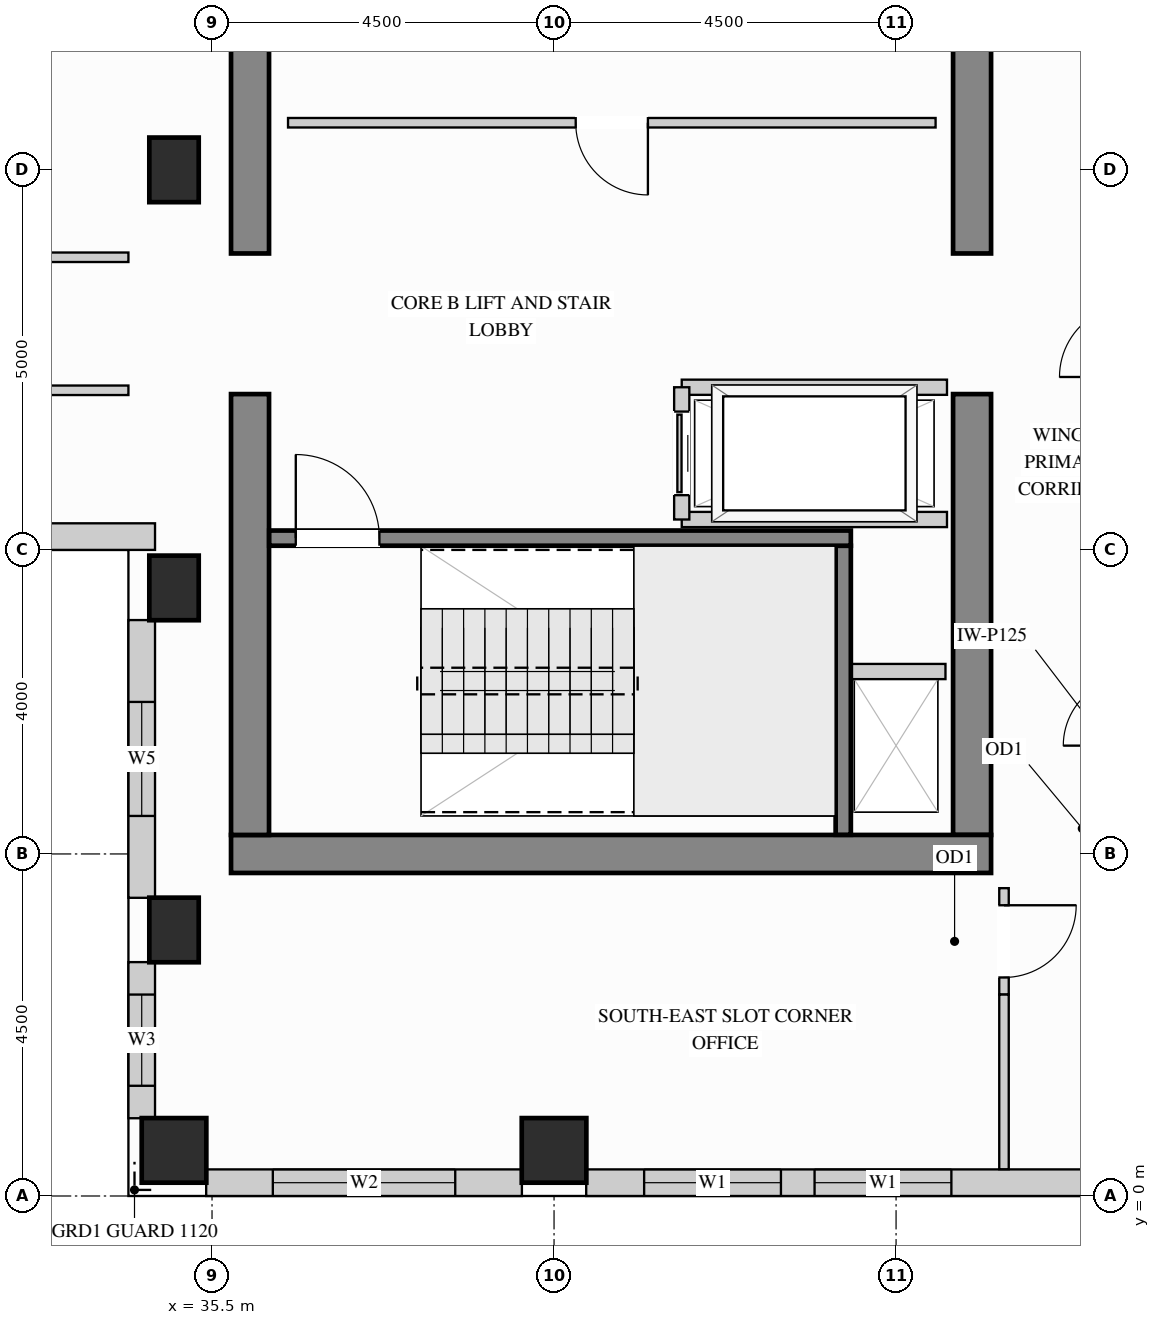
"""IFC4 building model, lengths in metres.
Left out: names, types, materials, properties, quantities, classifications, styles, units other than length and angle.
Written with IfcOpenShell. Run it as: python <this file> out.ifc"""

import sys

from ifc_helpers import new_model, si_unit, direction, frame, frame_2d, origin, origin_2d, place, context, subcontext, project, spatial, rectangle, extrude, source, transform, mapped, element, fill, save


model = new_model("IFC4")
c1 = context("Model", 3, precision=1e-05, world=origin(), true_north=direction((0.0, 1.0)))
c2 = subcontext(c1, "Body", "Model", "MODEL_VIEW")
j1 = project(units=[si_unit("LENGTHUNIT", "METRE"), si_unit("PLANEANGLEUNIT", "RADIAN")], contexts=[c1])
p1 = place(None, origin())
s1 = spatial("IfcSite", under=j1, at=p1, CompositionType="ELEMENT")
p2 = place(p1, origin())
s2 = spatial("IfcBuilding", under=s1, at=p2, CompositionType="ELEMENT")
p3 = place(p2, frame((0.0, 0.0, 234.0)))
s3 = spatial("IfcBuildingStorey", under=s2, at=p3, CompositionType="ELEMENT", Elevation=234.0)
m1 = source(origin(), c2, "Body", "SweptSolid", [
    extrude(rectangle(XDim=0.65, YDim=0.85, at=origin_2d()), origin(), (0.0, 0.0, 1.0), 3.4),
])
for number, where, z_axis, x_axis in (
    (1, (35.0, 13.5, 0.0), (0.0, 0.0, 1.0), (1.0, 0.0, 0.0)),
    (2, (35.0, 3.5, 0.0), (0.0, 0.0, 1.0), (1.0, 0.0, 0.0)),
    (3, (35.0, 8.0, 0.0), (0.0, 0.0, 1.0), (1.0, 0.0, 0.0)),
):
    element("IfcColumn", number, at=place(p3, frame(where, z_axis=z_axis, x_axis=x_axis)), inside=s3, PredefinedType="COLUMN", context=c2, shape_type="MappedRepresentation", body=[
        mapped(m1, transform((0.0, 0.0, 0.0), x_axis=(1.0, 0.0, 0.0), y_axis=(0.0, 1.0, 0.0), z_axis=(0.0, 0.0, 1.0))),
    ])
m2 = source(origin(), c2, "Body", "SweptSolid", [
    extrude(rectangle(XDim=0.85, YDim=0.85, at=origin_2d()), origin(), (0.0, 0.0, 1.0), 3.4),
])
for number, where, z_axis, x_axis in (
    (4, (35.0, 0.6, 0.0), (0.0, 0.0, 1.0), (1.0, 0.0, 0.0)),
    (5, (40.0, 0.6, 0.0), (0.0, 0.0, 1.0), (1.0, 0.0, 0.0)),
):
    element("IfcColumn", number, at=place(p3, frame(where, z_axis=z_axis, x_axis=x_axis)), inside=s3, PredefinedType="COLUMN", context=c2, shape_type="MappedRepresentation", body=[
        mapped(m2, transform((0.0, 0.0, 0.0), x_axis=(1.0, 0.0, 0.0), y_axis=(0.0, 1.0, 0.0), z_axis=(0.0, 0.0, 1.0))),
    ])
m3 = source(origin(), c2, "Body", "SweptSolid", [
    extrude(rectangle(XDim=5.8, YDim=0.5, at=frame_2d((2.9, 0.0))), origin(), (0.0, 0.0, 1.0), 3.4),
])
p4 = place(p3, frame((45.5, 4.75, 0.0), z_axis=(0.0, 0.0, 1.0), x_axis=(0.0, 1.0, 0.0)))
e6 = element("IfcWall", 6, at=p4, inside=s3, PredefinedType="SHEAR", context=c2, shape_type="MappedRepresentation", body=[
    mapped(m3, transform((0.0, 0.0, 0.0), x_axis=(1.0, 0.0, 0.0), y_axis=(0.0, 1.0, 0.0), z_axis=(0.0, 0.0, 1.0))),
])
m4 = source(origin(), c2, "Body", "SweptSolid", [
    extrude(rectangle(XDim=3.85, YDim=0.5, at=frame_2d((1.925, 0.0))), origin(), (0.0, 0.0, 1.0), 3.4),
])
p5 = place(p3, frame((45.5, 12.4, 0.0), z_axis=(0.0, 0.0, 1.0), x_axis=(0.0, 1.0, 0.0)))
e7 = element("IfcWall", 7, at=p5, inside=s3, PredefinedType="SHEAR", context=c2, shape_type="MappedRepresentation", body=[
    mapped(m4, transform((0.0, 0.0, 0.0), x_axis=(1.0, 0.0, 0.0), y_axis=(0.0, 1.0, 0.0), z_axis=(0.0, 0.0, 1.0))),
])
m5 = source(origin(), c2, "Body", "SweptSolid", [
    extrude(rectangle(XDim=10.0, YDim=0.5, at=frame_2d((5.0, 0.0))), origin(), (0.0, 0.0, 1.0), 3.4),
])
p6 = place(p3, frame((35.75, 4.5, 0.0), z_axis=(0.0, 0.0, 1.0), x_axis=(1.0, 0.0, 0.0)))
e8 = element("IfcWall", 8, at=p6, inside=s3, PredefinedType="SHEAR", context=c2, shape_type="MappedRepresentation", body=[
    mapped(m5, transform((0.0, 0.0, 0.0), x_axis=(1.0, 0.0, 0.0), y_axis=(0.0, 1.0, 0.0), z_axis=(0.0, 0.0, 1.0))),
])
p7 = place(p3, frame((36.0, 4.75, 0.0), z_axis=(0.0, 0.0, 1.0), x_axis=(0.0, 1.0, 0.0)))
e9 = element("IfcWall", 9, at=p7, inside=s3, PredefinedType="SHEAR", context=c2, shape_type="MappedRepresentation", body=[
    mapped(m3, transform((0.0, 0.0, 0.0), x_axis=(1.0, 0.0, 0.0), y_axis=(0.0, 1.0, 0.0), z_axis=(0.0, 0.0, 1.0))),
])
p8 = place(p3, frame((36.0, 12.4, 0.0), z_axis=(0.0, 0.0, 1.0), x_axis=(0.0, 1.0, 0.0)))
e10 = element("IfcWall", 10, at=p8, inside=s3, PredefinedType="SHEAR", context=c2, shape_type="MappedRepresentation", body=[
    mapped(m4, transform((0.0, 0.0, 0.0), x_axis=(1.0, 0.0, 0.0), y_axis=(0.0, 1.0, 0.0), z_axis=(0.0, 0.0, 1.0))),
])
p9 = place(p3, frame((19.323, 8.675, 0.0), z_axis=(0.0, 0.0, 1.0), x_axis=(1.0, 0.0, 0.0)))
e11 = element("IfcWall", 11, at=p9, inside=s3, PredefinedType="SOLIDWALL", context=c2, shape_type="SweptSolid", body=[
    extrude(rectangle(XDim=15.427, YDim=0.35, at=frame_2d((7.713, 0.0))), origin(), (0.0, 0.0, 1.0), 3.385),
])
p10 = place(p9, frame((4.249, 0.0, 0.78)))
e12 = element("IfcOpeningElement", 12, at=p10, cuts=e11, PredefinedType="OPENING", context=c2, shape_type="SweptSolid", body=[
    extrude(rectangle(XDim=1.5, YDim=2.0, at=frame_2d((0.75, 1.0))), frame((0.0, 0.185, 0.0), z_axis=(0.0, -1.0, 0.0), x_axis=(1.0, 0.0, 0.0)), (0.0, 0.0, 1.0), 0.37),
])
p11 = place(p9, frame((9.678, 0.0, 0.78)))
e13 = element("IfcOpeningElement", 13, at=p11, cuts=e11, PredefinedType="OPENING", context=c2, shape_type="SweptSolid", body=[
    extrude(rectangle(XDim=1.5, YDim=2.0, at=frame_2d((0.75, 1.0))), frame((0.0, 0.185, 0.0), z_axis=(0.0, -1.0, 0.0), x_axis=(1.0, 0.0, 0.0)), (0.0, 0.0, 1.0), 0.37),
])
p12 = place(p3, frame((34.575, 7.577, 0.0), z_axis=(0.0, 0.0, 1.0), x_axis=(0.0, -1.0, 0.0)))
e14 = element("IfcWall", 14, at=p12, inside=s3, PredefinedType="SOLIDWALL", context=c2, shape_type="SweptSolid", body=[
    extrude(rectangle(XDim=3.654, YDim=0.35, at=frame_2d((1.827, 0.0))), origin(), (0.0, 0.0, 1.0), 3.385),
])
p13 = place(p12, frame((1.077, 0.0, 0.78)))
e15 = element("IfcOpeningElement", 15, at=p13, cuts=e14, PredefinedType="OPENING", context=c2, shape_type="SweptSolid", body=[
    extrude(rectangle(XDim=1.5, YDim=2.0, at=frame_2d((0.75, 1.0))), frame((0.0, 0.185, 0.0), z_axis=(0.0, -1.0, 0.0), x_axis=(1.0, 0.0, 0.0)), (0.0, 0.0, 1.0), 0.37),
])
p14 = place(p3, frame((34.575, 3.077, 0.0), z_axis=(0.0, 0.0, 1.0), x_axis=(0.0, -1.0, 0.0)))
e16 = element("IfcWall", 16, at=p14, inside=s3, PredefinedType="SOLIDWALL", context=c2, shape_type="SweptSolid", body=[
    extrude(rectangle(XDim=2.054, YDim=0.35, at=frame_2d((1.027, 0.0))), origin(), (0.0, 0.0, 1.0), 3.385),
])
p15 = place(p14, frame((0.427, 0.0, 0.78)))
e17 = element("IfcOpeningElement", 17, at=p15, cuts=e16, PredefinedType="OPENING", context=c2, shape_type="SweptSolid", body=[
    extrude(rectangle(XDim=1.2, YDim=2.0, at=frame_2d((0.6, 1.0))), frame((0.0, 0.185, 0.0), z_axis=(0.0, -1.0, 0.0), x_axis=(1.0, 0.0, 0.0)), (0.0, 0.0, 1.0), 0.37),
])
p16 = place(p3, frame((35.423, 0.175, 0.0), z_axis=(0.0, 0.0, 1.0), x_axis=(1.0, 0.0, 0.0)))
e18 = element("IfcWall", 18, at=p16, inside=s3, PredefinedType="SOLIDWALL", context=c2, shape_type="SweptSolid", body=[
    extrude(rectangle(XDim=4.154, YDim=0.35, at=frame_2d((2.077, 0.0))), origin(), (0.0, 0.0, 1.0), 3.385),
])
p17 = place(p16, frame((0.877, 0.0, 0.78)))
e19 = element("IfcOpeningElement", 19, at=p17, cuts=e18, PredefinedType="OPENING", context=c2, shape_type="SweptSolid", body=[
    extrude(rectangle(XDim=2.4, YDim=2.1, at=frame_2d((1.2, 1.05))), frame((0.0, 0.185, 0.0), z_axis=(0.0, -1.0, 0.0), x_axis=(1.0, 0.0, 0.0)), (0.0, 0.0, 1.0), 0.37),
])
p18 = place(p3, frame((40.423, 0.175, 0.0), z_axis=(0.0, 0.0, 1.0), x_axis=(1.0, 0.0, 0.0)))
e20 = element("IfcWall", 20, at=p18, inside=s3, PredefinedType="SOLIDWALL", context=c2, shape_type="SweptSolid", body=[
    extrude(rectangle(XDim=7.077, YDim=0.35, at=frame_2d((3.539, 0.0))), origin(), (0.0, 0.0, 1.0), 3.385),
])
p19 = place(p18, frame((0.762, 0.0, 0.78)))
e21 = element("IfcOpeningElement", 21, at=p19, cuts=e20, PredefinedType="OPENING", context=c2, shape_type="SweptSolid", body=[
    extrude(rectangle(XDim=1.8, YDim=2.1, at=frame_2d((0.9, 1.05))), frame((0.0, 0.185, 0.0), z_axis=(0.0, -1.0, 0.0), x_axis=(1.0, 0.0, 0.0)), (0.0, 0.0, 1.0), 0.37),
])
p20 = place(p18, frame((3.005, 0.0, 0.78)))
e22 = element("IfcOpeningElement", 22, at=p20, cuts=e20, PredefinedType="OPENING", context=c2, shape_type="SweptSolid", body=[
    extrude(rectangle(XDim=1.8, YDim=2.1, at=frame_2d((0.9, 1.05))), frame((0.0, 0.185, 0.0), z_axis=(0.0, -1.0, 0.0), x_axis=(1.0, 0.0, 0.0)), (0.0, 0.0, 1.0), 0.37),
])
p21 = place(p3, frame((36.5, 14.12, 0.0), z_axis=(0.0, 0.0, 1.0), x_axis=(1.0, 0.0, 0.0)))
e23 = element("IfcWall", 23, at=p21, inside=s3, PredefinedType="PARTITIONING", context=c2, shape_type="SweptSolid", body=[
    extrude(rectangle(XDim=8.52, YDim=0.125, at=frame_2d((4.26, 0.0))), origin(), (0.0, 0.0, 1.0), 3.385),
])
p22 = place(p21, frame((3.785, 0.0, 0.0)))
e24 = element("IfcOpeningElement", 24, at=p22, cuts=e23, PredefinedType="OPENING", context=c2, shape_type="SweptSolid", body=[
    extrude(rectangle(XDim=0.95, YDim=2.15, at=frame_2d((0.475, 1.075))), frame((0.0, 0.073, 0.0), z_axis=(0.0, -1.0, 0.0), x_axis=(1.0, 0.0, 0.0)), (0.0, 0.0, 1.0), 0.145),
])
p23 = place(p3, frame((45.92, 2.65, 0.0), z_axis=(0.0, 0.0, 1.0), x_axis=(0.0, 1.0, 0.0)))
e25 = element("IfcWall", 25, at=p23, inside=s3, PredefinedType="PARTITIONING", context=c2, shape_type="SweptSolid", body=[
    extrude(rectangle(XDim=1.4, YDim=0.125, at=frame_2d((0.7, 0.0))), origin(), (0.0, 0.0, 1.0), 3.385),
])
p24 = place(p23, frame((0.225, 0.0, 0.0)))
e26 = element("IfcOpeningElement", 26, at=p24, cuts=e25, PredefinedType="OPENING", context=c2, shape_type="SweptSolid", body=[
    extrude(rectangle(XDim=0.95, YDim=2.15, at=frame_2d((0.475, 1.075))), frame((0.0, 0.073, 0.0), z_axis=(0.0, -1.0, 0.0), x_axis=(1.0, 0.0, 0.0)), (0.0, 0.0, 1.0), 0.145),
])
m6 = source(origin(), c2, "Body", "SweptSolid", [
    extrude(rectangle(XDim=2.298, YDim=0.125, at=frame_2d((1.149, 0.0))), origin(), (0.0, 0.0, 1.0), 3.385),
])
p25 = place(p3, frame((45.92, 0.352, 0.0), z_axis=(0.0, 0.0, 1.0), x_axis=(0.0, 1.0, 0.0)))
e27 = element("IfcWall", 27, at=p25, inside=s3, PredefinedType="PARTITIONING", context=c2, shape_type="MappedRepresentation", body=[
    mapped(m6, transform((0.0, 0.0, 0.0), x_axis=(1.0, 0.0, 0.0), y_axis=(0.0, 1.0, 0.0), z_axis=(0.0, 0.0, 1.0))),
])
p26 = place(p3, frame((29.85, 12.35, 0.0), z_axis=(0.0, 0.0, 1.0), x_axis=(1.0, 0.0, 0.0)))
e28 = element("IfcWall", 28, at=p26, inside=s3, PredefinedType="PARTITIONING", context=c2, shape_type="SweptSolid", body=[
    extrude(rectangle(XDim=4.55, YDim=0.125, at=frame_2d((2.275, 0.0))), origin(), (0.0, 0.0, 1.0), 3.385),
])
p27 = place(p26, frame((1.8, 0.0, 0.0)))
e29 = element("IfcOpeningElement", 29, at=p27, cuts=e28, PredefinedType="OPENING", context=c2, shape_type="SweptSolid", body=[
    extrude(rectangle(XDim=0.95, YDim=2.15, at=frame_2d((0.475, 1.075))), frame((0.0, 0.073, 0.0), z_axis=(0.0, -1.0, 0.0), x_axis=(1.0, 0.0, 0.0)), (0.0, 0.0, 1.0), 0.145),
])
p28 = place(p3, frame((19.5, 10.6, 0.0), z_axis=(0.0, 0.0, 1.0), x_axis=(1.0, 0.0, 0.0)))
e30 = element("IfcWall", 30, at=p28, inside=s3, PredefinedType="PARTITIONING", context=c2, shape_type="SweptSolid", body=[
    extrude(rectangle(XDim=14.9, YDim=0.125, at=frame_2d((7.45, 0.0))), origin(), (0.0, 0.0, 1.0), 3.385),
])
p29 = place(p28, frame((6.975, 0.0, 0.0)))
e31 = element("IfcOpeningElement", 31, at=p29, cuts=e30, PredefinedType="OPENING", context=c2, shape_type="SweptSolid", body=[
    extrude(rectangle(XDim=0.95, YDim=2.15, at=frame_2d((0.475, 1.075))), frame((0.0, 0.073, 0.0), z_axis=(0.0, -1.0, 0.0), x_axis=(1.0, 0.0, 0.0)), (0.0, 0.0, 1.0), 0.145),
])
m7 = source(origin(), c2, "Body", "SweptSolid", [
    extrude(rectangle(XDim=1.3, YDim=0.2, at=frame_2d((0.65, 0.0))), origin(), (0.0, 0.0, 1.0), 3.385),
])
p30 = place(p3, frame((43.85, 6.9, 0.0), z_axis=(0.0, 0.0, 1.0), x_axis=(1.0, 0.0, 0.0)))
e32 = element("IfcWall", 32, at=p30, inside=s3, PredefinedType="PARTITIONING", context=c2, shape_type="MappedRepresentation", body=[
    mapped(m7, transform((0.0, 0.0, 0.0), x_axis=(1.0, 0.0, 0.0), y_axis=(0.0, 1.0, 0.0), z_axis=(0.0, 0.0, 1.0))),
])
m8 = source(origin(), c2, "Body", "SweptSolid", [
    extrude(rectangle(XDim=3.49, YDim=0.2, at=frame_2d((1.745, 0.0))), origin(), (0.0, 0.0, 1.0), 3.385),
])
for number, where, z_axis, x_axis in (
    (33, (41.68, 10.64, 0.0), (0.0, 0.0, 1.0), (1.0, 0.0, 0.0)),
    (34, (41.68, 8.9, 0.0), (0.0, 0.0, 1.0), (1.0, 0.0, 0.0)),
):
    element("IfcWall", number, at=place(p3, frame(where, z_axis=z_axis, x_axis=x_axis)), inside=s3, PredefinedType="PARTITIONING", context=c2, shape_type="MappedRepresentation", body=[
        mapped(m8, transform((0.0, 0.0, 0.0), x_axis=(1.0, 0.0, 0.0), y_axis=(0.0, 1.0, 0.0), z_axis=(0.0, 0.0, 1.0))),
    ])
p31 = place(p3, frame((41.68, 8.9, 0.0), z_axis=(0.0, 0.0, 1.0), x_axis=(0.0, 1.0, 0.0)))
e35 = element("IfcWall", 35, at=p31, inside=s3, PredefinedType="PARTITIONING", context=c2, shape_type="SweptSolid", body=[
    extrude(rectangle(XDim=1.74, YDim=0.2, at=frame_2d((0.87, 0.0))), origin(), (0.0, 0.0, 1.0), 3.385),
])
p32 = place(p31, frame((0.32, 0.0, 0.0)))
e36 = element("IfcOpeningElement", 36, at=p32, cuts=e35, PredefinedType="OPENING", context=c2, shape_type="SweptSolid", body=[
    extrude(rectangle(XDim=1.1, YDim=2.2, at=frame_2d((0.55, 1.1))), frame((0.0, 0.11, 0.0), z_axis=(0.0, -1.0, 0.0), x_axis=(1.0, 0.0, 0.0)), (0.0, 0.0, 1.0), 0.22),
])
m9 = source(origin(), c2, "Body", "SweptSolid", [
    extrude(rectangle(XDim=3.803, YDim=0.2, at=frame_2d((1.901, 0.0))), origin(), (0.0, 0.0, 1.0), 3.4),
])
p33 = place(p3, frame((43.805, 4.752, 0.0), z_axis=(0.0, 0.0, 1.0), x_axis=(0.0, 1.0, 0.0)))
e37 = element("IfcWall", 37, at=p33, inside=s3, PredefinedType="SHEAR", context=c2, shape_type="MappedRepresentation", body=[
    mapped(m9, transform((0.0, 0.0, 0.0), x_axis=(1.0, 0.0, 0.0), y_axis=(0.0, 1.0, 0.0), z_axis=(0.0, 0.0, 1.0))),
])
p34 = place(p3, frame((36.252, 8.655, 0.0), z_axis=(0.0, 0.0, 1.0), x_axis=(1.0, 0.0, 0.0)))
e38 = element("IfcWall", 38, at=p34, inside=s3, PredefinedType="SHEAR", context=c2, shape_type="SweptSolid", body=[
    extrude(rectangle(XDim=7.653, YDim=0.2, at=frame_2d((3.827, 0.0))), origin(), (0.0, 0.0, 1.0), 3.4),
])
p35 = place(p34, frame((0.35, 0.0, 0.0)))
e39 = element("IfcOpeningElement", 39, at=p35, cuts=e38, PredefinedType="OPENING", context=c2, shape_type="SweptSolid", body=[
    extrude(rectangle(XDim=1.1, YDim=2.15, at=frame_2d((0.55, 1.075))), frame((0.0, 0.11, 0.0), z_axis=(0.0, -1.0, 0.0), x_axis=(1.0, 0.0, 0.0)), (0.0, 0.0, 1.0), 0.22),
])
m10 = source(origin(), c2, "Body", "SweptSolid", [
    extrude(rectangle(XDim=1.1, YDim=2.2, at=frame_2d((0.55, 1.1))), frame((0.0, 0.025, 0.0), z_axis=(0.0, -1.0, 0.0), x_axis=(1.0, 0.0, 0.0)), (0.0, 0.0, 1.0), 0.05),
])
p36 = place(p32, origin())
e40 = element("IfcDoor", 40, at=p36, inside=s3, OperationType="SLIDING_TO_LEFT", PredefinedType="DOOR", context=c2, shape_type="MappedRepresentation", body=[
    mapped(m10, transform((0.0, 0.0, 0.0), x_axis=(1.0, 0.0, 0.0), y_axis=(0.0, 1.0, 0.0), z_axis=(0.0, 0.0, 1.0))),
])
fill(e36, e40)
m11 = source(origin(), c2, "Body", "SweptSolid", [
    extrude(rectangle(XDim=0.95, YDim=2.15, at=frame_2d((0.475, 1.075))), frame((0.0, 0.025, 0.0), z_axis=(0.0, -1.0, 0.0), x_axis=(1.0, 0.0, 0.0)), (0.0, 0.0, 1.0), 0.05),
])
p37 = place(p22, origin())
e41 = element("IfcDoor", 41, at=p37, inside=s3, OperationType="SINGLE_SWING_RIGHT", PredefinedType="DOOR", context=c2, shape_type="MappedRepresentation", body=[
    mapped(m11, transform((0.0, 0.0, 0.0), x_axis=(1.0, 0.0, 0.0), y_axis=(0.0, 1.0, 0.0), z_axis=(0.0, 0.0, 1.0))),
])
fill(e24, e41)
p38 = place(p24, origin())
e42 = element("IfcDoor", 42, at=p38, inside=s3, OperationType="SINGLE_SWING_RIGHT", PredefinedType="DOOR", context=c2, shape_type="MappedRepresentation", body=[
    mapped(m11, transform((0.0, 0.0, 0.0), x_axis=(1.0, 0.0, 0.0), y_axis=(0.0, 1.0, 0.0), z_axis=(0.0, 0.0, 1.0))),
])
fill(e26, e42)
m12 = source(origin(), c2, "Body", "SweptSolid", [
    extrude(rectangle(XDim=1.1, YDim=2.15, at=frame_2d((0.55, 1.075))), frame((0.0, 0.025, 0.0), z_axis=(0.0, -1.0, 0.0), x_axis=(1.0, 0.0, 0.0)), (0.0, 0.0, 1.0), 0.05),
])
p39 = place(p35, origin())
e43 = element("IfcDoor", 43, at=p39, inside=s3, OperationType="SINGLE_SWING_LEFT", PredefinedType="DOOR", context=c2, shape_type="MappedRepresentation", body=[
    mapped(m12, transform((0.0, 0.0, 0.0), x_axis=(1.0, 0.0, 0.0), y_axis=(0.0, 1.0, 0.0), z_axis=(0.0, 0.0, 1.0))),
])
fill(e39, e43)
m13 = source(origin(), c2, "Body", "SweptSolid", [
    extrude(rectangle(XDim=1.8, YDim=2.1, at=frame_2d((0.9, 1.05))), frame((0.0, 0.03, 0.0), z_axis=(0.0, -1.0, 0.0), x_axis=(1.0, 0.0, 0.0)), (0.0, 0.0, 1.0), 0.06),
])
p40 = place(p19, origin())
e44 = element("IfcWindow", 44, at=p40, inside=s3, PartitioningType="SINGLE_PANEL", PredefinedType="WINDOW", context=c2, shape_type="MappedRepresentation", body=[
    mapped(m13, transform((0.0, 0.0, 0.0), x_axis=(1.0, 0.0, 0.0), y_axis=(0.0, 1.0, 0.0), z_axis=(0.0, 0.0, 1.0))),
])
fill(e21, e44)
p41 = place(p20, origin())
e45 = element("IfcWindow", 45, at=p41, inside=s3, PartitioningType="SINGLE_PANEL", PredefinedType="WINDOW", context=c2, shape_type="MappedRepresentation", body=[
    mapped(m13, transform((0.0, 0.0, 0.0), x_axis=(1.0, 0.0, 0.0), y_axis=(0.0, 1.0, 0.0), z_axis=(0.0, 0.0, 1.0))),
])
fill(e22, e45)
m14 = source(origin(), c2, "Body", "SweptSolid", [
    extrude(rectangle(XDim=2.4, YDim=2.1, at=frame_2d((1.2, 1.05))), frame((0.0, 0.03, 0.0), z_axis=(0.0, -1.0, 0.0), x_axis=(1.0, 0.0, 0.0)), (0.0, 0.0, 1.0), 0.06),
])
p42 = place(p17, origin())
e46 = element("IfcWindow", 46, at=p42, inside=s3, PartitioningType="SINGLE_PANEL", PredefinedType="WINDOW", context=c2, shape_type="MappedRepresentation", body=[
    mapped(m14, transform((0.0, 0.0, 0.0), x_axis=(1.0, 0.0, 0.0), y_axis=(0.0, 1.0, 0.0), z_axis=(0.0, 0.0, 1.0))),
])
fill(e19, e46)
m15 = source(origin(), c2, "Body", "SweptSolid", [
    extrude(rectangle(XDim=1.2, YDim=2.0, at=frame_2d((0.6, 1.0))), frame((0.0, 0.03, 0.0), z_axis=(0.0, -1.0, 0.0), x_axis=(1.0, 0.0, 0.0)), (0.0, 0.0, 1.0), 0.06),
])
p43 = place(p15, origin())
e47 = element("IfcWindow", 47, at=p43, inside=s3, PartitioningType="SINGLE_PANEL", PredefinedType="WINDOW", context=c2, shape_type="MappedRepresentation", body=[
    mapped(m15, transform((0.0, 0.0, 0.0), x_axis=(1.0, 0.0, 0.0), y_axis=(0.0, 1.0, 0.0), z_axis=(0.0, 0.0, 1.0))),
])
fill(e17, e47)
m16 = source(origin(), c2, "Body", "SweptSolid", [
    extrude(rectangle(XDim=1.5, YDim=2.0, at=frame_2d((0.75, 1.0))), frame((0.0, 0.03, 0.0), z_axis=(0.0, -1.0, 0.0), x_axis=(1.0, 0.0, 0.0)), (0.0, 0.0, 1.0), 0.06),
])
p44 = place(p13, origin())
e48 = element("IfcWindow", 48, at=p44, inside=s3, PartitioningType="SINGLE_PANEL", PredefinedType="WINDOW", context=c2, shape_type="MappedRepresentation", body=[
    mapped(m16, transform((0.0, 0.0, 0.0), x_axis=(1.0, 0.0, 0.0), y_axis=(0.0, 1.0, 0.0), z_axis=(0.0, 0.0, 1.0))),
])
fill(e15, e48)
save(model, sys.argv[1])
